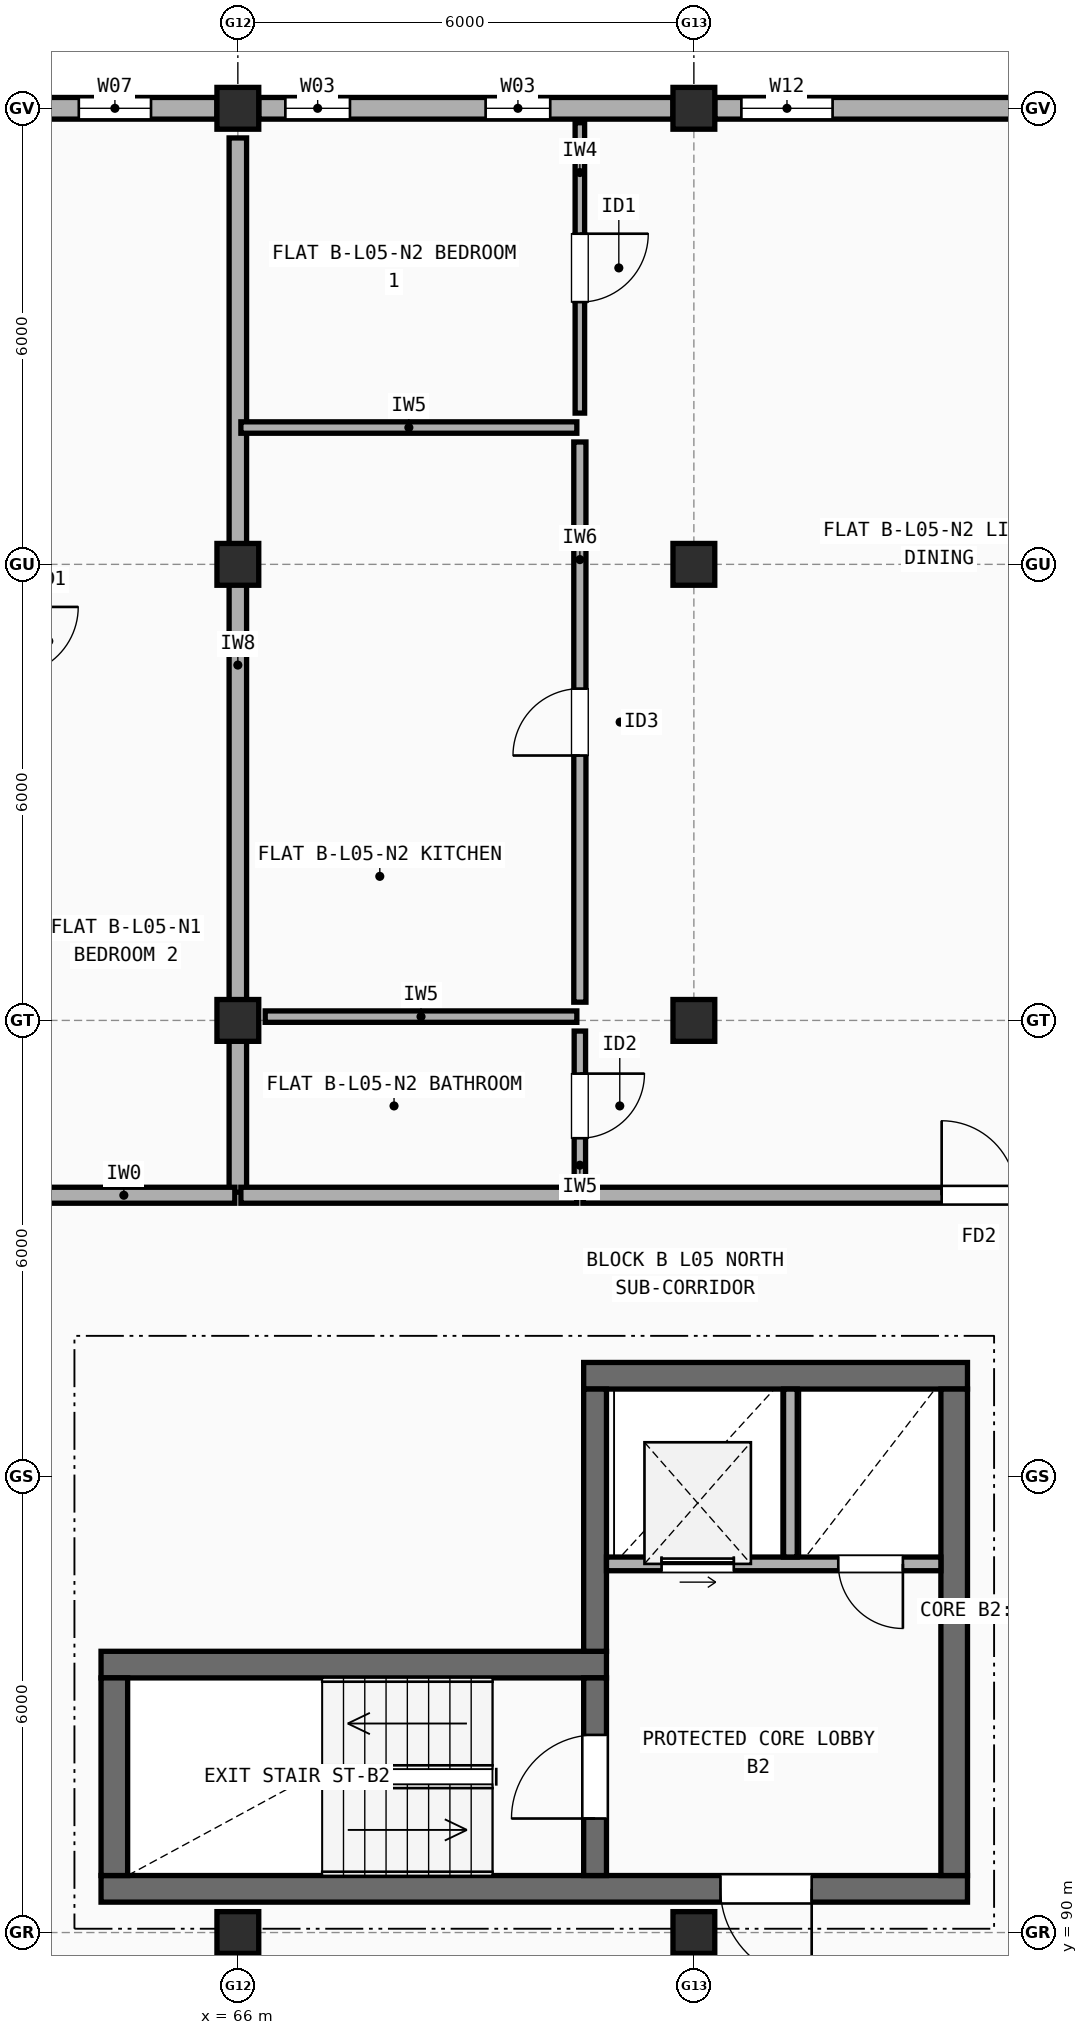
"""IFC4 building model, lengths in metres.
Left out: names, types, materials, properties, quantities, classifications, styles, units other than length and angle.
Written with IfcOpenShell. Run it as: python <this file> out.ifc"""

import sys

from ifc_helpers import new_model, si_unit, direction, frame, frame_2d, origin, origin_2d, place, context, subcontext, project, spatial, rectangle, extrude, element, fill, save


model = new_model("IFC4")
c1 = context("Model", 3, precision=1e-05, world=origin(), true_north=direction((0.0, 1.0)))
c2 = subcontext(c1, "Body", "Model", "MODEL_VIEW")
j1 = project(units=[si_unit("LENGTHUNIT", "METRE"), si_unit("PLANEANGLEUNIT", "RADIAN")], contexts=[c1])
p1 = place(None, origin())
s1 = spatial("IfcSite", under=j1, at=p1, CompositionType="ELEMENT")
p2 = place(p1, origin())
s2 = spatial("IfcBuilding", under=s1, at=p2, CompositionType="ELEMENT")
p3 = place(p2, frame((0.0, 0.0, 17.3)))
s3 = spatial("IfcBuildingStorey", under=s2, at=p3, CompositionType="ELEMENT", Elevation=17.3)
for number, where, z_axis, x_axis in (
    (1, (66.0, 90.0, 0.0), (0.0, 0.0, 1.0), (1.0, 0.0, 0.0)),
    (2, (66.0, 102.0, 0.0), (0.0, 0.0, 1.0), (1.0, 0.0, 0.0)),
    (3, (66.0, 108.0, 0.0), (0.0, 0.0, 1.0), (1.0, 0.0, 0.0)),
    (4, (66.0, 114.0, 0.0), (0.0, 0.0, 1.0), (1.0, 0.0, 0.0)),
    (5, (72.0, 90.0, 0.0), (0.0, 0.0, 1.0), (1.0, 0.0, 0.0)),
    (6, (72.0, 102.0, 0.0), (0.0, 0.0, 1.0), (1.0, 0.0, 0.0)),
    (7, (72.0, 108.0, 0.0), (0.0, 0.0, 1.0), (1.0, 0.0, 0.0)),
    (8, (72.0, 114.0, 0.0), (0.0, 0.0, 1.0), (1.0, 0.0, 0.0)),
):
    element("IfcColumn", number, at=place(p3, frame(where, z_axis=z_axis, x_axis=x_axis)), inside=s3, PredefinedType="COLUMN", context=c2, shape_type="SweptSolid", body=[
        extrude(rectangle(XDim=0.55, YDim=0.55, at=origin_2d()), origin(), (0.0, 0.0, 1.0), 2.965),
    ])
p4 = place(p3, frame((77.75, 114.0, 0.0), z_axis=(0.0, 0.0, 1.0), x_axis=(-1.0, 0.0, 0.0)))
e9 = element("IfcWall", 9, at=p4, inside=s3, PredefinedType="STANDARD", context=c2, shape_type="SweptSolid", body=[
    extrude(rectangle(XDim=5.475, YDim=0.285, at=frame_2d((2.738, 0.0))), origin(), (0.0, 0.0, 1.0), 2.447),
])
p5 = place(p4, frame((0.35, 0.0, 0.9)))
e10 = element("IfcOpeningElement", 10, at=p5, cuts=e9, PredefinedType="OPENING", context=c2, shape_type="SweptSolid", body=[
    extrude(rectangle(XDim=1.2, YDim=1.35, at=frame_2d((0.6, 0.675))), frame((0.0, 0.152, 0.0), z_axis=(0.0, -1.0, 0.0), x_axis=(1.0, 0.0, 0.0)), (0.0, 0.0, 1.0), 0.305),
])
p6 = place(p4, frame((3.925, 0.0, 0.9)))
e11 = element("IfcOpeningElement", 11, at=p6, cuts=e9, PredefinedType="OPENING", context=c2, shape_type="SweptSolid", body=[
    extrude(rectangle(XDim=1.2, YDim=1.35, at=frame_2d((0.6, 0.675))), frame((0.0, 0.152, 0.0), z_axis=(0.0, -1.0, 0.0), x_axis=(1.0, 0.0, 0.0)), (0.0, 0.0, 1.0), 0.305),
])
p7 = place(p3, frame((71.725, 114.0, 0.0), z_axis=(0.0, 0.0, 1.0), x_axis=(-1.0, 0.0, 0.0)))
e12 = element("IfcWall", 12, at=p7, inside=s3, PredefinedType="STANDARD", context=c2, shape_type="SweptSolid", body=[
    extrude(rectangle(XDim=5.45, YDim=0.285, at=frame_2d((2.725, 0.0))), origin(), (0.0, 0.0, 1.0), 2.447),
])
p8 = place(p7, frame((1.615, 0.0, 0.9)))
e13 = element("IfcOpeningElement", 13, at=p8, cuts=e12, PredefinedType="OPENING", context=c2, shape_type="SweptSolid", body=[
    extrude(rectangle(XDim=0.85, YDim=1.25, at=frame_2d((0.425, 0.625))), frame((0.0, 0.152, 0.0), z_axis=(0.0, -1.0, 0.0), x_axis=(1.0, 0.0, 0.0)), (0.0, 0.0, 1.0), 0.305),
])
p9 = place(p7, frame((4.25, 0.0, 0.9)))
e14 = element("IfcOpeningElement", 14, at=p9, cuts=e12, PredefinedType="OPENING", context=c2, shape_type="SweptSolid", body=[
    extrude(rectangle(XDim=0.85, YDim=1.25, at=frame_2d((0.425, 0.625))), frame((0.0, 0.152, 0.0), z_axis=(0.0, -1.0, 0.0), x_axis=(1.0, 0.0, 0.0)), (0.0, 0.0, 1.0), 0.305),
])
p10 = place(p3, frame((65.725, 114.0, 0.0), z_axis=(0.0, 0.0, 1.0), x_axis=(-1.0, 0.0, 0.0)))
e15 = element("IfcWall", 15, at=p10, inside=s3, PredefinedType="STANDARD", context=c2, shape_type="SweptSolid", body=[
    extrude(rectangle(XDim=5.45, YDim=0.285, at=frame_2d((2.725, 0.0))), origin(), (0.0, 0.0, 1.0), 2.447),
])
p11 = place(p10, frame((0.867, 0.0, 0.9)))
e16 = element("IfcOpeningElement", 16, at=p11, cuts=e15, PredefinedType="OPENING", context=c2, shape_type="SweptSolid", body=[
    extrude(rectangle(XDim=0.95, YDim=1.35, at=frame_2d((0.475, 0.675))), frame((0.0, 0.152, 0.0), z_axis=(0.0, -1.0, 0.0), x_axis=(1.0, 0.0, 0.0)), (0.0, 0.0, 1.0), 0.305),
])
p12 = place(p10, frame((3.583, 0.0, 0.9)))
e17 = element("IfcOpeningElement", 17, at=p12, cuts=e15, PredefinedType="OPENING", context=c2, shape_type="SweptSolid", body=[
    extrude(rectangle(XDim=1.05, YDim=1.35, at=frame_2d((0.525, 0.675))), frame((0.0, 0.152, 0.0), z_axis=(0.0, -1.0, 0.0), x_axis=(1.0, 0.0, 0.0)), (0.0, 0.0, 1.0), 0.305),
])
p13 = place(p3, frame((64.2, 90.575, 0.0), z_axis=(0.0, 0.0, 1.0), x_axis=(1.0, 0.0, 0.0)))
e18 = element("IfcWall", 18, at=p13, inside=s3, PredefinedType="SHEAR", context=c2, shape_type="SweptSolid", body=[
    extrude(rectangle(XDim=11.4, YDim=0.35, at=frame_2d((5.7, 0.0))), origin(), (0.0, 0.0, 1.0), 2.965),
])
p14 = place(p13, frame((8.15, 0.0, 0.0)))
e19 = element("IfcOpeningElement", 19, at=p14, cuts=e18, PredefinedType="OPENING", context=c2, shape_type="SweptSolid", body=[
    extrude(rectangle(XDim=1.2, YDim=2.15, at=frame_2d((0.6, 1.075))), frame((0.0, 0.185, 0.0), z_axis=(0.0, -1.0, 0.0), x_axis=(1.0, 0.0, 0.0)), (0.0, 0.0, 1.0), 0.37),
])
p15 = place(p3, frame((70.85, 93.525, 0.0), z_axis=(0.0, 0.0, 1.0), x_axis=(-1.0, 0.0, 0.0)))
e20 = element("IfcWall", 20, at=p15, inside=s3, PredefinedType="SHEAR", context=c2, shape_type="SweptSolid", body=[
    extrude(rectangle(XDim=6.65, YDim=0.35, at=frame_2d((3.325, 0.0))), origin(), (0.0, 0.0, 1.0), 2.965),
])
p16 = place(p3, frame((64.375, 93.35, 0.0), z_axis=(0.0, 0.0, 1.0), x_axis=(0.0, -1.0, 0.0)))
e21 = element("IfcWall", 21, at=p16, inside=s3, PredefinedType="SHEAR", context=c2, shape_type="SweptSolid", body=[
    extrude(rectangle(XDim=2.6, YDim=0.35, at=frame_2d((1.3, 0.0))), origin(), (0.0, 0.0, 1.0), 2.965),
])
p17 = place(p3, frame((70.7, 90.75, 0.0), z_axis=(0.0, 0.0, 1.0), x_axis=(0.0, 1.0, 0.0)))
e22 = element("IfcWall", 22, at=p17, inside=s3, PredefinedType="SHEAR", context=c2, shape_type="SweptSolid", body=[
    extrude(rectangle(XDim=2.6, YDim=0.3, at=frame_2d((1.3, 0.0))), origin(), (0.0, 0.0, 1.0), 2.965),
])
p18 = place(p17, frame((0.75, 0.0, 0.0)))
e23 = element("IfcOpeningElement", 23, at=p18, cuts=e22, PredefinedType="OPENING", context=c2, shape_type="SweptSolid", body=[
    extrude(rectangle(XDim=1.1, YDim=2.15, at=frame_2d((0.55, 1.075))), frame((0.0, 0.16, 0.0), z_axis=(0.0, -1.0, 0.0), x_axis=(1.0, 0.0, 0.0)), (0.0, 0.0, 1.0), 0.32),
])
p19 = place(p3, frame((75.6, 97.325, 0.0), z_axis=(0.0, 0.0, 1.0), x_axis=(-1.0, 0.0, 0.0)))
e24 = element("IfcWall", 24, at=p19, inside=s3, PredefinedType="SHEAR", context=c2, shape_type="SweptSolid", body=[
    extrude(rectangle(XDim=5.05, YDim=0.35, at=frame_2d((2.525, 0.0))), origin(), (0.0, 0.0, 1.0), 2.965),
])
p20 = place(p3, frame((75.425, 90.75, 0.0), z_axis=(0.0, 0.0, 1.0), x_axis=(0.0, 1.0, 0.0)))
e25 = element("IfcWall", 25, at=p20, inside=s3, PredefinedType="SHEAR", context=c2, shape_type="SweptSolid", body=[
    extrude(rectangle(XDim=6.4, YDim=0.35, at=frame_2d((3.2, 0.0))), origin(), (0.0, 0.0, 1.0), 2.965),
])
p21 = place(p3, frame((70.7, 93.7, 0.0), z_axis=(0.0, 0.0, 1.0), x_axis=(0.0, 1.0, 0.0)))
e26 = element("IfcWall", 26, at=p21, inside=s3, PredefinedType="SHEAR", context=c2, shape_type="SweptSolid", body=[
    extrude(rectangle(XDim=3.45, YDim=0.3, at=frame_2d((1.725, 0.0))), origin(), (0.0, 0.0, 1.0), 2.965),
])
p22 = place(p3, frame((70.85, 94.85, 0.0), z_axis=(0.0, 0.0, 1.0), x_axis=(1.0, 0.0, 0.0)))
e27 = element("IfcWall", 27, at=p22, inside=s3, PredefinedType="SOLIDWALL", context=c2, shape_type="SweptSolid", body=[
    extrude(rectangle(XDim=4.4, YDim=0.18, at=frame_2d((2.2, 0.0))), origin(), (0.0, 0.0, 1.0), 2.965),
])
p23 = place(p22, frame((0.725, 0.0, 0.0)))
e28 = element("IfcOpeningElement", 28, at=p23, cuts=e27, PredefinedType="OPENING", context=c2, shape_type="SweptSolid", body=[
    extrude(rectangle(XDim=0.95, YDim=2.15, at=frame_2d((0.475, 1.075))), frame((0.0, 0.1, 0.0), z_axis=(0.0, -1.0, 0.0), x_axis=(1.0, 0.0, 0.0)), (0.0, 0.0, 1.0), 0.2),
])
p24 = place(p22, frame((3.05, 0.0, 0.0)))
e29 = element("IfcOpeningElement", 29, at=p24, cuts=e27, PredefinedType="OPENING", context=c2, shape_type="SweptSolid", body=[
    extrude(rectangle(XDim=0.85, YDim=2.1, at=frame_2d((0.425, 1.05))), frame((0.0, 0.1, 0.0), z_axis=(0.0, -1.0, 0.0), x_axis=(1.0, 0.0, 0.0)), (0.0, 0.0, 1.0), 0.2),
])
p25 = place(p3, frame((73.27, 94.94, 0.0), z_axis=(0.0, 0.0, 1.0), x_axis=(0.0, 1.0, 0.0)))
e30 = element("IfcWall", 30, at=p25, inside=s3, PredefinedType="SOLIDWALL", context=c2, shape_type="SweptSolid", body=[
    extrude(rectangle(XDim=2.21, YDim=0.18, at=frame_2d((1.105, 0.0))), origin(), (0.0, 0.0, 1.0), 2.965),
])
p26 = place(p3, frame((66.0, 99.74, 0.0), z_axis=(0.0, 0.0, 1.0), x_axis=(0.0, 1.0, 0.0)))
e31 = element("IfcWall", 31, at=p26, inside=s3, PredefinedType="SOLIDWALL", context=c2, shape_type="SweptSolid", body=[
    extrude(rectangle(XDim=13.87, YDim=0.23, at=frame_2d((6.935, 0.0))), origin(), (0.0, 0.0, 1.0), 2.458),
])
p27 = place(p3, frame((63.04, 99.7, 0.0), z_axis=(0.0, 0.0, 1.0), x_axis=(1.0, 0.0, 0.0)))
e32 = element("IfcWall", 32, at=p27, inside=s3, PredefinedType="SOLIDWALL", context=c2, shape_type="SweptSolid", body=[
    extrude(rectangle(XDim=2.92, YDim=0.21, at=frame_2d((1.46, 0.0))), origin(), (0.0, 0.0, 1.0), 2.965),
])
p28 = place(p3, frame((66.04, 99.7, 0.0), z_axis=(0.0, 0.0, 1.0), x_axis=(1.0, 0.0, 0.0)))
e33 = element("IfcWall", 33, at=p28, inside=s3, PredefinedType="SOLIDWALL", context=c2, shape_type="SweptSolid", body=[
    extrude(rectangle(XDim=4.42, YDim=0.21, at=frame_2d((2.21, 0.0))), origin(), (0.0, 0.0, 1.0), 2.965),
])
p29 = place(p3, frame((70.54, 99.7, 0.0), z_axis=(0.0, 0.0, 1.0), x_axis=(1.0, 0.0, 0.0)))
e34 = element("IfcWall", 34, at=p29, inside=s3, PredefinedType="SOLIDWALL", context=c2, shape_type="SweptSolid", body=[
    extrude(rectangle(XDim=10.42, YDim=0.21, at=frame_2d((5.21, 0.0))), origin(), (0.0, 0.0, 1.0), 2.447),
])
p30 = place(p29, frame((4.72, 0.0, 0.0)))
e35 = element("IfcOpeningElement", 35, at=p30, cuts=e34, PredefinedType="OPENING", context=c2, shape_type="SweptSolid", body=[
    extrude(rectangle(XDim=0.98, YDim=2.15, at=frame_2d((0.49, 1.075))), frame((0.0, 0.115, 0.0), z_axis=(0.0, -1.0, 0.0), x_axis=(1.0, 0.0, 0.0)), (0.0, 0.0, 1.0), 0.23),
])
p31 = place(p3, frame((70.5, 109.99, 0.0), z_axis=(0.0, 0.0, 1.0), x_axis=(0.0, 1.0, 0.0)))
e36 = element("IfcWall", 36, at=p31, inside=s3, PredefinedType="PARTITIONING", context=c2, shape_type="SweptSolid", body=[
    extrude(rectangle(XDim=3.82, YDim=0.125, at=frame_2d((1.91, 0.0))), origin(), (0.0, 0.0, 1.0), 2.965),
])
p32 = place(p31, frame((1.46, 0.0, 0.0)))
e37 = element("IfcOpeningElement", 37, at=p32, cuts=e36, PredefinedType="OPENING", context=c2, shape_type="SweptSolid", body=[
    extrude(rectangle(XDim=0.9, YDim=2.1, at=frame_2d((0.45, 1.05))), frame((0.0, 0.073, 0.0), z_axis=(0.0, -1.0, 0.0), x_axis=(1.0, 0.0, 0.0)), (0.0, 0.0, 1.0), 0.145),
])
p33 = place(p3, frame((70.5, 102.24, 0.0), z_axis=(0.0, 0.0, 1.0), x_axis=(0.0, 1.0, 0.0)))
e38 = element("IfcWall", 38, at=p33, inside=s3, PredefinedType="PLUMBINGWALL", context=c2, shape_type="SweptSolid", body=[
    extrude(rectangle(XDim=7.37, YDim=0.16, at=frame_2d((3.685, 0.0))), origin(), (0.0, 0.0, 1.0), 2.447),
])
p34 = place(p33, frame((3.245, 0.0, 0.0)))
e39 = element("IfcOpeningElement", 39, at=p34, cuts=e38, PredefinedType="OPENING", context=c2, shape_type="SweptSolid", body=[
    extrude(rectangle(XDim=0.88, YDim=2.1, at=frame_2d((0.44, 1.05))), frame((0.0, 0.09, 0.0), z_axis=(0.0, -1.0, 0.0), x_axis=(1.0, 0.0, 0.0)), (0.0, 0.0, 1.0), 0.18),
])
p35 = place(p3, frame((70.5, 99.89, 0.0), z_axis=(0.0, 0.0, 1.0), x_axis=(0.0, 1.0, 0.0)))
e40 = element("IfcWall", 40, at=p35, inside=s3, PredefinedType="PARTITIONING", context=c2, shape_type="SweptSolid", body=[
    extrude(rectangle(XDim=1.97, YDim=0.15, at=frame_2d((0.985, 0.0))), origin(), (0.0, 0.0, 1.0), 2.965),
])
p36 = place(p35, frame((0.56, 0.0, 0.0)))
e41 = element("IfcOpeningElement", 41, at=p36, cuts=e40, PredefinedType="OPENING", context=c2, shape_type="SweptSolid", body=[
    extrude(rectangle(XDim=0.85, YDim=2.1, at=frame_2d((0.425, 1.05))), frame((0.0, 0.085, 0.0), z_axis=(0.0, -1.0, 0.0), x_axis=(1.0, 0.0, 0.0)), (0.0, 0.0, 1.0), 0.17),
])
p37 = place(p3, frame((66.04, 109.8, 0.0), z_axis=(0.0, 0.0, 1.0), x_axis=(1.0, 0.0, 0.0)))
e42 = element("IfcWall", 42, at=p37, inside=s3, PredefinedType="PARTITIONING", context=c2, shape_type="SweptSolid", body=[
    extrude(rectangle(XDim=4.42, YDim=0.15, at=frame_2d((2.21, 0.0))), origin(), (0.0, 0.0, 1.0), 2.458),
])
p38 = place(p3, frame((66.36, 102.05, 0.0), z_axis=(0.0, 0.0, 1.0), x_axis=(1.0, 0.0, 0.0)))
e43 = element("IfcWall", 43, at=p38, inside=s3, PredefinedType="PARTITIONING", context=c2, shape_type="SweptSolid", body=[
    extrude(rectangle(XDim=4.1, YDim=0.15, at=frame_2d((2.05, 0.0))), origin(), (0.0, 0.0, 1.0), 2.447),
])
p39 = place(p6, origin())
e44 = element("IfcWindow", 44, at=p39, inside=s3, PartitioningType="SINGLE_PANEL", PredefinedType="WINDOW", context=c2, shape_type="SweptSolid", body=[
    extrude(rectangle(XDim=1.2, YDim=1.35, at=frame_2d((0.6, 0.675))), frame((0.0, 0.03, 0.0), z_axis=(0.0, -1.0, 0.0), x_axis=(1.0, 0.0, 0.0)), (0.0, 0.0, 1.0), 0.06),
])
fill(e11, e44)
p40 = place(p8, origin())
e45 = element("IfcWindow", 45, at=p40, inside=s3, PartitioningType="SINGLE_PANEL", PredefinedType="WINDOW", context=c2, shape_type="SweptSolid", body=[
    extrude(rectangle(XDim=0.85, YDim=1.25, at=frame_2d((0.425, 0.625))), frame((0.0, 0.03, 0.0), z_axis=(0.0, -1.0, 0.0), x_axis=(1.0, 0.0, 0.0)), (0.0, 0.0, 1.0), 0.06),
])
fill(e13, e45)
p41 = place(p9, origin())
e46 = element("IfcWindow", 46, at=p41, inside=s3, PartitioningType="SINGLE_PANEL", PredefinedType="WINDOW", context=c2, shape_type="SweptSolid", body=[
    extrude(rectangle(XDim=0.85, YDim=1.25, at=frame_2d((0.425, 0.625))), frame((0.0, 0.03, 0.0), z_axis=(0.0, -1.0, 0.0), x_axis=(1.0, 0.0, 0.0)), (0.0, 0.0, 1.0), 0.06),
])
fill(e14, e46)
p42 = place(p11, origin())
e47 = element("IfcWindow", 47, at=p42, inside=s3, PartitioningType="SINGLE_PANEL", PredefinedType="WINDOW", context=c2, shape_type="SweptSolid", body=[
    extrude(rectangle(XDim=0.95, YDim=1.35, at=frame_2d((0.475, 0.675))), frame((0.0, 0.03, 0.0), z_axis=(0.0, -1.0, 0.0), x_axis=(1.0, 0.0, 0.0)), (0.0, 0.0, 1.0), 0.06),
])
fill(e16, e47)
p43 = place(p14, origin())
e48 = element("IfcDoor", 48, at=p43, inside=s3, OperationType="SINGLE_SWING_RIGHT", PredefinedType="DOOR", context=c2, shape_type="SweptSolid", body=[
    extrude(rectangle(XDim=1.2, YDim=2.15, at=frame_2d((0.6, 1.075))), frame((0.0, 0.025, 0.0), z_axis=(0.0, -1.0, 0.0), x_axis=(1.0, 0.0, 0.0)), (0.0, 0.0, 1.0), 0.05),
])
fill(e19, e48)
p44 = place(p18, origin())
e49 = element("IfcDoor", 49, at=p44, inside=s3, OperationType="SINGLE_SWING_LEFT", PredefinedType="DOOR", context=c2, shape_type="SweptSolid", body=[
    extrude(rectangle(XDim=1.1, YDim=2.15, at=frame_2d((0.55, 1.075))), frame((0.0, 0.025, 0.0), z_axis=(0.0, -1.0, 0.0), x_axis=(1.0, 0.0, 0.0)), (0.0, 0.0, 1.0), 0.05),
])
fill(e23, e49)
p45 = place(p23, origin())
e50 = element("IfcDoor", 50, at=p45, inside=s3, OperationType="SLIDING_TO_LEFT", PredefinedType="DOOR", context=c2, shape_type="SweptSolid", body=[
    extrude(rectangle(XDim=0.95, YDim=2.15, at=frame_2d((0.475, 1.075))), frame((0.0, 0.025, 0.0), z_axis=(0.0, -1.0, 0.0), x_axis=(1.0, 0.0, 0.0)), (0.0, 0.0, 1.0), 0.05),
])
fill(e28, e50)
p46 = place(p24, frame((0.85, 0.0, 0.0), z_axis=(0.0, 0.0, 1.0), x_axis=(-1.0, 0.0, 0.0)))
e51 = element("IfcDoor", 51, at=p46, inside=s3, OperationType="SINGLE_SWING_RIGHT", PredefinedType="DOOR", context=c2, shape_type="SweptSolid", body=[
    extrude(rectangle(XDim=0.85, YDim=2.1, at=frame_2d((0.425, 1.05))), frame((0.0, 0.025, 0.0), z_axis=(0.0, -1.0, 0.0), x_axis=(1.0, 0.0, 0.0)), (0.0, 0.0, 1.0), 0.05),
])
fill(e29, e51)
p47 = place(p30, origin())
e52 = element("IfcDoor", 52, at=p47, inside=s3, OperationType="SINGLE_SWING_LEFT", PredefinedType="DOOR", context=c2, shape_type="SweptSolid", body=[
    extrude(rectangle(XDim=0.98, YDim=2.15, at=frame_2d((0.49, 1.075))), frame((0.0, 0.025, 0.0), z_axis=(0.0, -1.0, 0.0), x_axis=(1.0, 0.0, 0.0)), (0.0, 0.0, 1.0), 0.05),
])
fill(e35, e52)
p48 = place(p32, origin())
e53 = element("IfcDoor", 53, at=p48, inside=s3, OperationType="SINGLE_SWING_RIGHT", PredefinedType="DOOR", context=c2, shape_type="SweptSolid", body=[
    extrude(rectangle(XDim=0.9, YDim=2.1, at=frame_2d((0.45, 1.05))), frame((0.0, 0.025, 0.0), z_axis=(0.0, -1.0, 0.0), x_axis=(1.0, 0.0, 0.0)), (0.0, 0.0, 1.0), 0.05),
])
fill(e37, e53)
p49 = place(p34, origin())
e54 = element("IfcDoor", 54, at=p49, inside=s3, OperationType="SINGLE_SWING_LEFT", PredefinedType="DOOR", context=c2, shape_type="SweptSolid", body=[
    extrude(rectangle(XDim=0.88, YDim=2.1, at=frame_2d((0.44, 1.05))), frame((0.0, 0.025, 0.0), z_axis=(0.0, -1.0, 0.0), x_axis=(1.0, 0.0, 0.0)), (0.0, 0.0, 1.0), 0.05),
])
fill(e39, e54)
p50 = place(p36, origin())
e55 = element("IfcDoor", 55, at=p50, inside=s3, OperationType="SINGLE_SWING_RIGHT", PredefinedType="DOOR", context=c2, shape_type="SweptSolid", body=[
    extrude(rectangle(XDim=0.85, YDim=2.1, at=frame_2d((0.425, 1.05))), frame((0.0, 0.025, 0.0), z_axis=(0.0, -1.0, 0.0), x_axis=(1.0, 0.0, 0.0)), (0.0, 0.0, 1.0), 0.05),
])
fill(e41, e55)
save(model, sys.argv[1])
